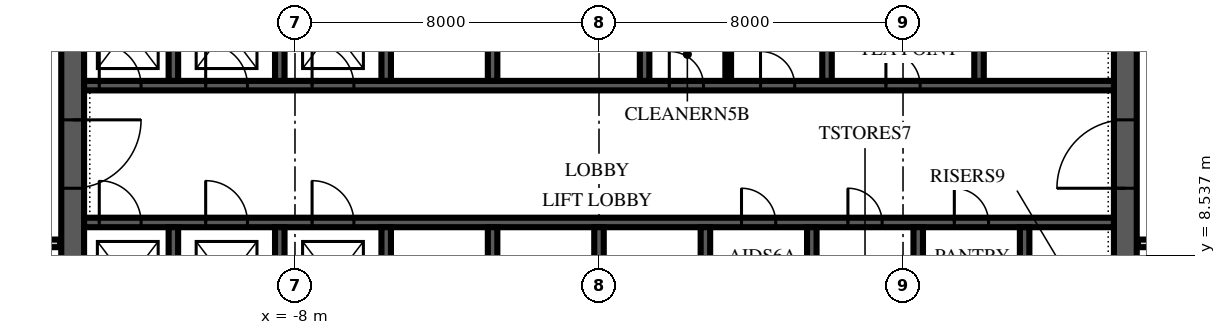
"""IFC4 building model, lengths in metres.
Left out: names, types, materials, properties, quantities, classifications, styles, units other than length and angle.
Written with IfcOpenShell. Run it as: python <this file> out.ifc"""

import sys

from ifc_helpers import new_model, si_unit, direction, frame, frame_2d, origin, place, context, subcontext, project, spatial, polyline, rectangle, outline, extrude, element, fill, save


model = new_model("IFC4")
c1 = context("Model", 3, precision=1e-05, world=origin(), true_north=direction((0.0, 1.0)))
c2 = subcontext(c1, "Body", "Model", "MODEL_VIEW")
j1 = project(units=[si_unit("LENGTHUNIT", "METRE"), si_unit("PLANEANGLEUNIT", "RADIAN")], contexts=[c1])
p1 = place(None, origin())
s1 = spatial("IfcSite", under=j1, at=p1, CompositionType="ELEMENT")
p2 = place(p1, origin())
s2 = spatial("IfcBuilding", under=s1, at=p2, CompositionType="ELEMENT")
p3 = place(p2, frame((0.0, 0.0, 190.0)))
s3 = spatial("IfcBuildingStorey", under=s2, at=p3, CompositionType="ELEMENT", Elevation=190.0)
p4 = place(p3, frame((13.85, 6.15, 0.0), z_axis=(0.0, 0.0, 1.0), x_axis=(0.0, 1.0, 0.0)))
e1 = element("IfcWall", 1, at=p4, inside=s3, PredefinedType="SHEAR", context=c2, shape_type="SweptSolid", body=[
    extrude(outline(polyline([(0.0, -0.3), (17.7, -0.3), (17.7, 0.0), (17.4, 0.0), (17.4, 0.3), (0.3, 0.3), (0.3, 0.0), (0.0, 0.0), (0.0, -0.3)])), origin(), (0.0, 0.0, 1.0), 4.0),
])
p5 = place(p4, frame((4.15, 0.0, 0.0)))
e2 = element("IfcOpeningElement", 2, at=p5, cuts=e1, PredefinedType="OPENING", context=c2, shape_type="SweptSolid", body=[
    extrude(rectangle(XDim=1.8, YDim=2.4, at=frame_2d((0.9, 1.2))), frame((0.0, 0.315, 0.0), z_axis=(0.0, -1.0, 0.0), x_axis=(1.0, 0.0, 0.0)), (0.0, 0.0, 1.0), 0.63),
])
p6 = place(p3, frame((-13.85, 23.85, 0.0), z_axis=(0.0, 0.0, 1.0), x_axis=(0.0, -1.0, 0.0)))
e3 = element("IfcWall", 3, at=p6, inside=s3, PredefinedType="SHEAR", context=c2, shape_type="SweptSolid", body=[
    extrude(outline(polyline([(0.0, -0.3), (17.7, -0.3), (17.7, 0.0), (17.4, 0.0), (17.4, 0.3), (0.3, 0.3), (0.3, 0.0), (0.0, 0.0), (0.0, -0.3)])), origin(), (0.0, 0.0, 1.0), 4.0),
])
p7 = place(p6, frame((11.75, 0.0, 0.0)))
e4 = element("IfcOpeningElement", 4, at=p7, cuts=e3, PredefinedType="OPENING", context=c2, shape_type="SweptSolid", body=[
    extrude(rectangle(XDim=1.8, YDim=2.4, at=frame_2d((0.9, 1.2))), frame((0.0, 0.315, 0.0), z_axis=(0.0, -1.0, 0.0), x_axis=(1.0, 0.0, 0.0)), (0.0, 0.0, 1.0), 0.63),
])
p8 = place(p3, frame((-13.55, 9.4, 0.0), z_axis=(0.0, 0.0, 1.0), x_axis=(1.0, 0.0, 0.0)))
e5 = element("IfcWall", 5, at=p8, inside=s3, PredefinedType="SHEAR", context=c2, shape_type="SweptSolid", body=[
    extrude(rectangle(XDim=27.1, YDim=0.25, at=frame_2d((13.55, 0.0))), origin(), (0.0, 0.0, 1.0), 4.0),
])
p9 = place(p8, frame((0.4, 0.0, 0.0)))
e6 = element("IfcOpeningElement", 6, at=p9, cuts=e5, PredefinedType="OPENING", context=c2, shape_type="SweptSolid", body=[
    extrude(rectangle(XDim=1.1, YDim=2.1, at=frame_2d((0.55, 1.05))), frame((0.0, 0.14, 0.0), z_axis=(0.0, -1.0, 0.0), x_axis=(1.0, 0.0, 0.0)), (0.0, 0.0, 1.0), 0.28),
])
p10 = place(p8, frame((3.2, 0.0, 0.0)))
e7 = element("IfcOpeningElement", 7, at=p10, cuts=e5, PredefinedType="OPENING", context=c2, shape_type="SweptSolid", body=[
    extrude(rectangle(XDim=1.1, YDim=2.1, at=frame_2d((0.55, 1.05))), frame((0.0, 0.14, 0.0), z_axis=(0.0, -1.0, 0.0), x_axis=(1.0, 0.0, 0.0)), (0.0, 0.0, 1.0), 0.28),
])
p11 = place(p8, frame((6.0, 0.0, 0.0)))
e8 = element("IfcOpeningElement", 8, at=p11, cuts=e5, PredefinedType="OPENING", context=c2, shape_type="SweptSolid", body=[
    extrude(rectangle(XDim=1.1, YDim=2.1, at=frame_2d((0.55, 1.05))), frame((0.0, 0.14, 0.0), z_axis=(0.0, -1.0, 0.0), x_axis=(1.0, 0.0, 0.0)), (0.0, 0.0, 1.0), 0.28),
])
p12 = place(p8, frame((17.3, 0.0, 0.0)))
e9 = element("IfcOpeningElement", 9, at=p12, cuts=e5, PredefinedType="OPENING", context=c2, shape_type="SweptSolid", body=[
    extrude(rectangle(XDim=0.9, YDim=2.1, at=frame_2d((0.45, 1.05))), frame((0.0, 0.14, 0.0), z_axis=(0.0, -1.0, 0.0), x_axis=(1.0, 0.0, 0.0)), (0.0, 0.0, 1.0), 0.28),
])
p13 = place(p8, frame((20.1, 0.0, 0.0)))
e10 = element("IfcOpeningElement", 10, at=p13, cuts=e5, PredefinedType="OPENING", context=c2, shape_type="SweptSolid", body=[
    extrude(rectangle(XDim=0.9, YDim=2.1, at=frame_2d((0.45, 1.05))), frame((0.0, 0.14, 0.0), z_axis=(0.0, -1.0, 0.0), x_axis=(1.0, 0.0, 0.0)), (0.0, 0.0, 1.0), 0.28),
])
p14 = place(p8, frame((22.9, 0.0, 0.0)))
e11 = element("IfcOpeningElement", 11, at=p14, cuts=e5, PredefinedType="OPENING", context=c2, shape_type="SweptSolid", body=[
    extrude(rectangle(XDim=0.9, YDim=2.1, at=frame_2d((0.45, 1.05))), frame((0.0, 0.14, 0.0), z_axis=(0.0, -1.0, 0.0), x_axis=(1.0, 0.0, 0.0)), (0.0, 0.0, 1.0), 0.28),
])
p15 = place(p3, frame((-13.55, 13.0, 0.0), z_axis=(0.0, 0.0, 1.0), x_axis=(1.0, 0.0, 0.0)))
e12 = element("IfcWall", 12, at=p15, inside=s3, PredefinedType="SHEAR", context=c2, shape_type="SweptSolid", body=[
    extrude(rectangle(XDim=27.1, YDim=0.25, at=frame_2d((13.55, 0.0))), origin(), (0.0, 0.0, 1.0), 4.0),
])
p16 = place(p15, frame((0.4, 0.0, 0.0)))
e13 = element("IfcOpeningElement", 13, at=p16, cuts=e12, PredefinedType="OPENING", context=c2, shape_type="SweptSolid", body=[
    extrude(rectangle(XDim=1.1, YDim=2.1, at=frame_2d((0.55, 1.05))), frame((0.0, 0.14, 0.0), z_axis=(0.0, -1.0, 0.0), x_axis=(1.0, 0.0, 0.0)), (0.0, 0.0, 1.0), 0.28),
])
p17 = place(p15, frame((3.2, 0.0, 0.0)))
e14 = element("IfcOpeningElement", 14, at=p17, cuts=e12, PredefinedType="OPENING", context=c2, shape_type="SweptSolid", body=[
    extrude(rectangle(XDim=1.1, YDim=2.1, at=frame_2d((0.55, 1.05))), frame((0.0, 0.14, 0.0), z_axis=(0.0, -1.0, 0.0), x_axis=(1.0, 0.0, 0.0)), (0.0, 0.0, 1.0), 0.28),
])
p18 = place(p15, frame((6.0, 0.0, 0.0)))
e15 = element("IfcOpeningElement", 15, at=p18, cuts=e12, PredefinedType="OPENING", context=c2, shape_type="SweptSolid", body=[
    extrude(rectangle(XDim=1.1, YDim=2.1, at=frame_2d((0.55, 1.05))), frame((0.0, 0.14, 0.0), z_axis=(0.0, -1.0, 0.0), x_axis=(1.0, 0.0, 0.0)), (0.0, 0.0, 1.0), 0.28),
])
p19 = place(p15, frame((17.8, 0.0, 0.0)))
e16 = element("IfcOpeningElement", 16, at=p19, cuts=e12, PredefinedType="OPENING", context=c2, shape_type="SweptSolid", body=[
    extrude(rectangle(XDim=0.9, YDim=2.1, at=frame_2d((0.45, 1.05))), frame((0.0, 0.14, 0.0), z_axis=(0.0, -1.0, 0.0), x_axis=(1.0, 0.0, 0.0)), (0.0, 0.0, 1.0), 0.28),
])
p20 = place(p15, frame((15.4, 0.0, 0.0)))
e17 = element("IfcOpeningElement", 17, at=p20, cuts=e12, PredefinedType="OPENING", context=c2, shape_type="SweptSolid", body=[
    extrude(rectangle(XDim=0.9, YDim=2.1, at=frame_2d((0.45, 1.05))), frame((0.0, 0.14, 0.0), z_axis=(0.0, -1.0, 0.0), x_axis=(1.0, 0.0, 0.0)), (0.0, 0.0, 1.0), 0.28),
])
p21 = place(p15, frame((21.1, 0.0, 0.0)))
e18 = element("IfcOpeningElement", 18, at=p21, cuts=e12, PredefinedType="OPENING", context=c2, shape_type="SweptSolid", body=[
    extrude(rectangle(XDim=0.9, YDim=2.1, at=frame_2d((0.45, 1.05))), frame((0.0, 0.14, 0.0), z_axis=(0.0, -1.0, 0.0), x_axis=(1.0, 0.0, 0.0)), (0.0, 0.0, 1.0), 0.28),
])
for number, where, z_axis, x_axis in (
    (19, (-11.2, 6.45, 0.0), (0.0, 0.0, 1.0), (0.0, 1.0, 0.0)),
    (20, (-8.4, 6.45, 0.0), (0.0, 0.0, 1.0), (0.0, 1.0, 0.0)),
    (21, (-5.6, 6.45, 0.0), (0.0, 0.0, 1.0), (0.0, 1.0, 0.0)),
    (22, (-2.8, 6.45, 0.0), (0.0, 0.0, 1.0), (0.0, 1.0, 0.0)),
    (23, (0.0, 6.45, 0.0), (0.0, 0.0, 1.0), (0.0, 1.0, 0.0)),
    (24, (2.8, 6.45, 0.0), (0.0, 0.0, 1.0), (0.0, 1.0, 0.0)),
    (25, (5.6, 6.45, 0.0), (0.0, 0.0, 1.0), (0.0, 1.0, 0.0)),
    (26, (8.4, 6.45, 0.0), (0.0, 0.0, 1.0), (0.0, 1.0, 0.0)),
    (27, (11.2, 6.45, 0.0), (0.0, 0.0, 1.0), (0.0, 1.0, 0.0)),
):
    element("IfcWall", number, at=place(p3, frame(where, z_axis=z_axis, x_axis=x_axis)), inside=s3, PredefinedType="SHEAR", context=c2, shape_type="SweptSolid", body=[
        extrude(rectangle(XDim=2.825, YDim=0.25, at=frame_2d((1.413, 0.0))), origin(), (0.0, 0.0, 1.0), 4.0),
    ])
for number, where, z_axis, x_axis in (
    (28, (-11.2, 13.125, 0.0), (0.0, 0.0, 1.0), (0.0, 1.0, 0.0)),
    (29, (-8.4, 13.125, 0.0), (0.0, 0.0, 1.0), (0.0, 1.0, 0.0)),
    (30, (-5.6, 13.125, 0.0), (0.0, 0.0, 1.0), (0.0, 1.0, 0.0)),
    (31, (-2.8, 13.125, 0.0), (0.0, 0.0, 1.0), (0.0, 1.0, 0.0)),
    (32, (1.2, 13.125, 0.0), (0.0, 0.0, 1.0), (0.0, 1.0, 0.0)),
    (33, (6.0, 13.125, 0.0), (0.0, 0.0, 1.0), (0.0, 1.0, 0.0)),
    (34, (10.0, 13.125, 0.0), (0.0, 0.0, 1.0), (0.0, 1.0, 0.0)),
):
    element("IfcWall", number, at=place(p3, frame(where, z_axis=z_axis, x_axis=x_axis)), inside=s3, PredefinedType="SHEAR", context=c2, shape_type="SweptSolid", body=[
        extrude(rectangle(XDim=2.75, YDim=0.25, at=frame_2d((1.375, 0.0))), origin(), (0.0, 0.0, 1.0), 4.0),
    ])
p22 = place(p3, frame((3.4, 13.125, 0.0), z_axis=(0.0, 0.0, 1.0), x_axis=(0.0, 1.0, 0.0)))
e35 = element("IfcWall", 35, at=p22, inside=s3, PredefinedType="PARTITIONING", context=c2, shape_type="SweptSolid", body=[
    extrude(rectangle(XDim=1.55, YDim=0.15, at=frame_2d((0.775, 0.0))), origin(), (0.0, 0.0, 1.0), 3.85),
])
for number, where, z_axis, x_axis in (
    (36, (-16.2, 8.85, 0.0), (0.0, 0.0, 1.0), (1.0, 0.0, 0.0)),
    (37, (14.18, 8.85, 0.0), (0.0, 0.0, 1.0), (1.0, 0.0, 0.0)),
):
    element("IfcWall", number, at=place(p3, frame(where, z_axis=z_axis, x_axis=x_axis)), inside=s3, PredefinedType="PARTITIONING", context=c2, shape_type="SweptSolid", body=[
        extrude(rectangle(XDim=2.02, YDim=0.2, at=frame_2d((1.01, 0.0))), origin(), (0.0, 0.0, 1.0), 3.85),
    ])
p23 = place(p5, origin())
e38 = element("IfcDoor", 38, at=p23, inside=s3, OperationType="DOUBLE_DOOR_SINGLE_SWING", PredefinedType="DOOR", context=c2, shape_type="SweptSolid", body=[
    extrude(rectangle(XDim=1.8, YDim=2.4, at=frame_2d((0.9, 1.2))), frame((0.0, 0.3, 0.0), z_axis=(0.0, -1.0, 0.0), x_axis=(1.0, 0.0, 0.0)), (0.0, 0.0, 1.0), 0.6),
])
fill(e2, e38)
p24 = place(p7, origin())
e39 = element("IfcDoor", 39, at=p24, inside=s3, OperationType="DOUBLE_DOOR_SINGLE_SWING", PredefinedType="DOOR", context=c2, shape_type="SweptSolid", body=[
    extrude(rectangle(XDim=1.8, YDim=2.4, at=frame_2d((0.9, 1.2))), frame((0.0, 0.3, 0.0), z_axis=(0.0, -1.0, 0.0), x_axis=(1.0, 0.0, 0.0)), (0.0, 0.0, 1.0), 0.6),
])
fill(e4, e39)
p25 = place(p9, origin())
e40 = element("IfcDoor", 40, at=p25, inside=s3, OperationType="SLIDING_TO_LEFT", PredefinedType="DOOR", context=c2, shape_type="SweptSolid", body=[
    extrude(rectangle(XDim=1.1, YDim=2.1, at=frame_2d((0.55, 1.05))), frame((0.0, 0.125, 0.0), z_axis=(0.0, -1.0, 0.0), x_axis=(1.0, 0.0, 0.0)), (0.0, 0.0, 1.0), 0.25),
])
fill(e6, e40)
p26 = place(p10, origin())
e41 = element("IfcDoor", 41, at=p26, inside=s3, OperationType="SLIDING_TO_LEFT", PredefinedType="DOOR", context=c2, shape_type="SweptSolid", body=[
    extrude(rectangle(XDim=1.1, YDim=2.1, at=frame_2d((0.55, 1.05))), frame((0.0, 0.125, 0.0), z_axis=(0.0, -1.0, 0.0), x_axis=(1.0, 0.0, 0.0)), (0.0, 0.0, 1.0), 0.25),
])
fill(e7, e41)
p27 = place(p11, origin())
e42 = element("IfcDoor", 42, at=p27, inside=s3, OperationType="SLIDING_TO_LEFT", PredefinedType="DOOR", context=c2, shape_type="SweptSolid", body=[
    extrude(rectangle(XDim=1.1, YDim=2.1, at=frame_2d((0.55, 1.05))), frame((0.0, 0.125, 0.0), z_axis=(0.0, -1.0, 0.0), x_axis=(1.0, 0.0, 0.0)), (0.0, 0.0, 1.0), 0.25),
])
fill(e8, e42)
p28 = place(p16, origin())
e43 = element("IfcDoor", 43, at=p28, inside=s3, OperationType="SLIDING_TO_LEFT", PredefinedType="DOOR", context=c2, shape_type="SweptSolid", body=[
    extrude(rectangle(XDim=1.1, YDim=2.1, at=frame_2d((0.55, 1.05))), frame((0.0, 0.125, 0.0), z_axis=(0.0, -1.0, 0.0), x_axis=(1.0, 0.0, 0.0)), (0.0, 0.0, 1.0), 0.25),
])
fill(e13, e43)
p29 = place(p17, origin())
e44 = element("IfcDoor", 44, at=p29, inside=s3, OperationType="SLIDING_TO_LEFT", PredefinedType="DOOR", context=c2, shape_type="SweptSolid", body=[
    extrude(rectangle(XDim=1.1, YDim=2.1, at=frame_2d((0.55, 1.05))), frame((0.0, 0.125, 0.0), z_axis=(0.0, -1.0, 0.0), x_axis=(1.0, 0.0, 0.0)), (0.0, 0.0, 1.0), 0.25),
])
fill(e14, e44)
p30 = place(p18, origin())
e45 = element("IfcDoor", 45, at=p30, inside=s3, OperationType="SLIDING_TO_LEFT", PredefinedType="DOOR", context=c2, shape_type="SweptSolid", body=[
    extrude(rectangle(XDim=1.1, YDim=2.1, at=frame_2d((0.55, 1.05))), frame((0.0, 0.125, 0.0), z_axis=(0.0, -1.0, 0.0), x_axis=(1.0, 0.0, 0.0)), (0.0, 0.0, 1.0), 0.25),
])
fill(e15, e45)
p31 = place(p19, origin())
e46 = element("IfcDoor", 46, at=p31, inside=s3, OperationType="SINGLE_SWING_LEFT", PredefinedType="DOOR", context=c2, shape_type="SweptSolid", body=[
    extrude(rectangle(XDim=0.9, YDim=2.1, at=frame_2d((0.45, 1.05))), frame((0.0, 0.125, 0.0), z_axis=(0.0, -1.0, 0.0), x_axis=(1.0, 0.0, 0.0)), (0.0, 0.0, 1.0), 0.25),
])
fill(e16, e46)
p32 = place(p20, origin())
e47 = element("IfcDoor", 47, at=p32, inside=s3, OperationType="SINGLE_SWING_LEFT", PredefinedType="DOOR", context=c2, shape_type="SweptSolid", body=[
    extrude(rectangle(XDim=0.9, YDim=2.1, at=frame_2d((0.45, 1.05))), frame((0.0, 0.125, 0.0), z_axis=(0.0, -1.0, 0.0), x_axis=(1.0, 0.0, 0.0)), (0.0, 0.0, 1.0), 0.25),
])
fill(e17, e47)
p33 = place(p21, origin())
e48 = element("IfcDoor", 48, at=p33, inside=s3, OperationType="SINGLE_SWING_LEFT", PredefinedType="DOOR", context=c2, shape_type="SweptSolid", body=[
    extrude(rectangle(XDim=0.9, YDim=2.1, at=frame_2d((0.45, 1.05))), frame((0.0, 0.125, 0.0), z_axis=(0.0, -1.0, 0.0), x_axis=(1.0, 0.0, 0.0)), (0.0, 0.0, 1.0), 0.25),
])
fill(e18, e48)
p34 = place(p12, origin())
e49 = element("IfcDoor", 49, at=p34, inside=s3, OperationType="SINGLE_SWING_LEFT", PredefinedType="DOOR", context=c2, shape_type="SweptSolid", body=[
    extrude(rectangle(XDim=0.9, YDim=2.1, at=frame_2d((0.45, 1.05))), frame((0.0, 0.125, 0.0), z_axis=(0.0, -1.0, 0.0), x_axis=(1.0, 0.0, 0.0)), (0.0, 0.0, 1.0), 0.25),
])
fill(e9, e49)
p35 = place(p13, origin())
e50 = element("IfcDoor", 50, at=p35, inside=s3, OperationType="SINGLE_SWING_LEFT", PredefinedType="DOOR", context=c2, shape_type="SweptSolid", body=[
    extrude(rectangle(XDim=0.9, YDim=2.1, at=frame_2d((0.45, 1.05))), frame((0.0, 0.125, 0.0), z_axis=(0.0, -1.0, 0.0), x_axis=(1.0, 0.0, 0.0)), (0.0, 0.0, 1.0), 0.25),
])
fill(e10, e50)
p36 = place(p14, origin())
e51 = element("IfcDoor", 51, at=p36, inside=s3, OperationType="SINGLE_SWING_LEFT", PredefinedType="DOOR", context=c2, shape_type="SweptSolid", body=[
    extrude(rectangle(XDim=0.9, YDim=2.1, at=frame_2d((0.45, 1.05))), frame((0.0, 0.125, 0.0), z_axis=(0.0, -1.0, 0.0), x_axis=(1.0, 0.0, 0.0)), (0.0, 0.0, 1.0), 0.25),
])
fill(e11, e51)
save(model, sys.argv[1])
